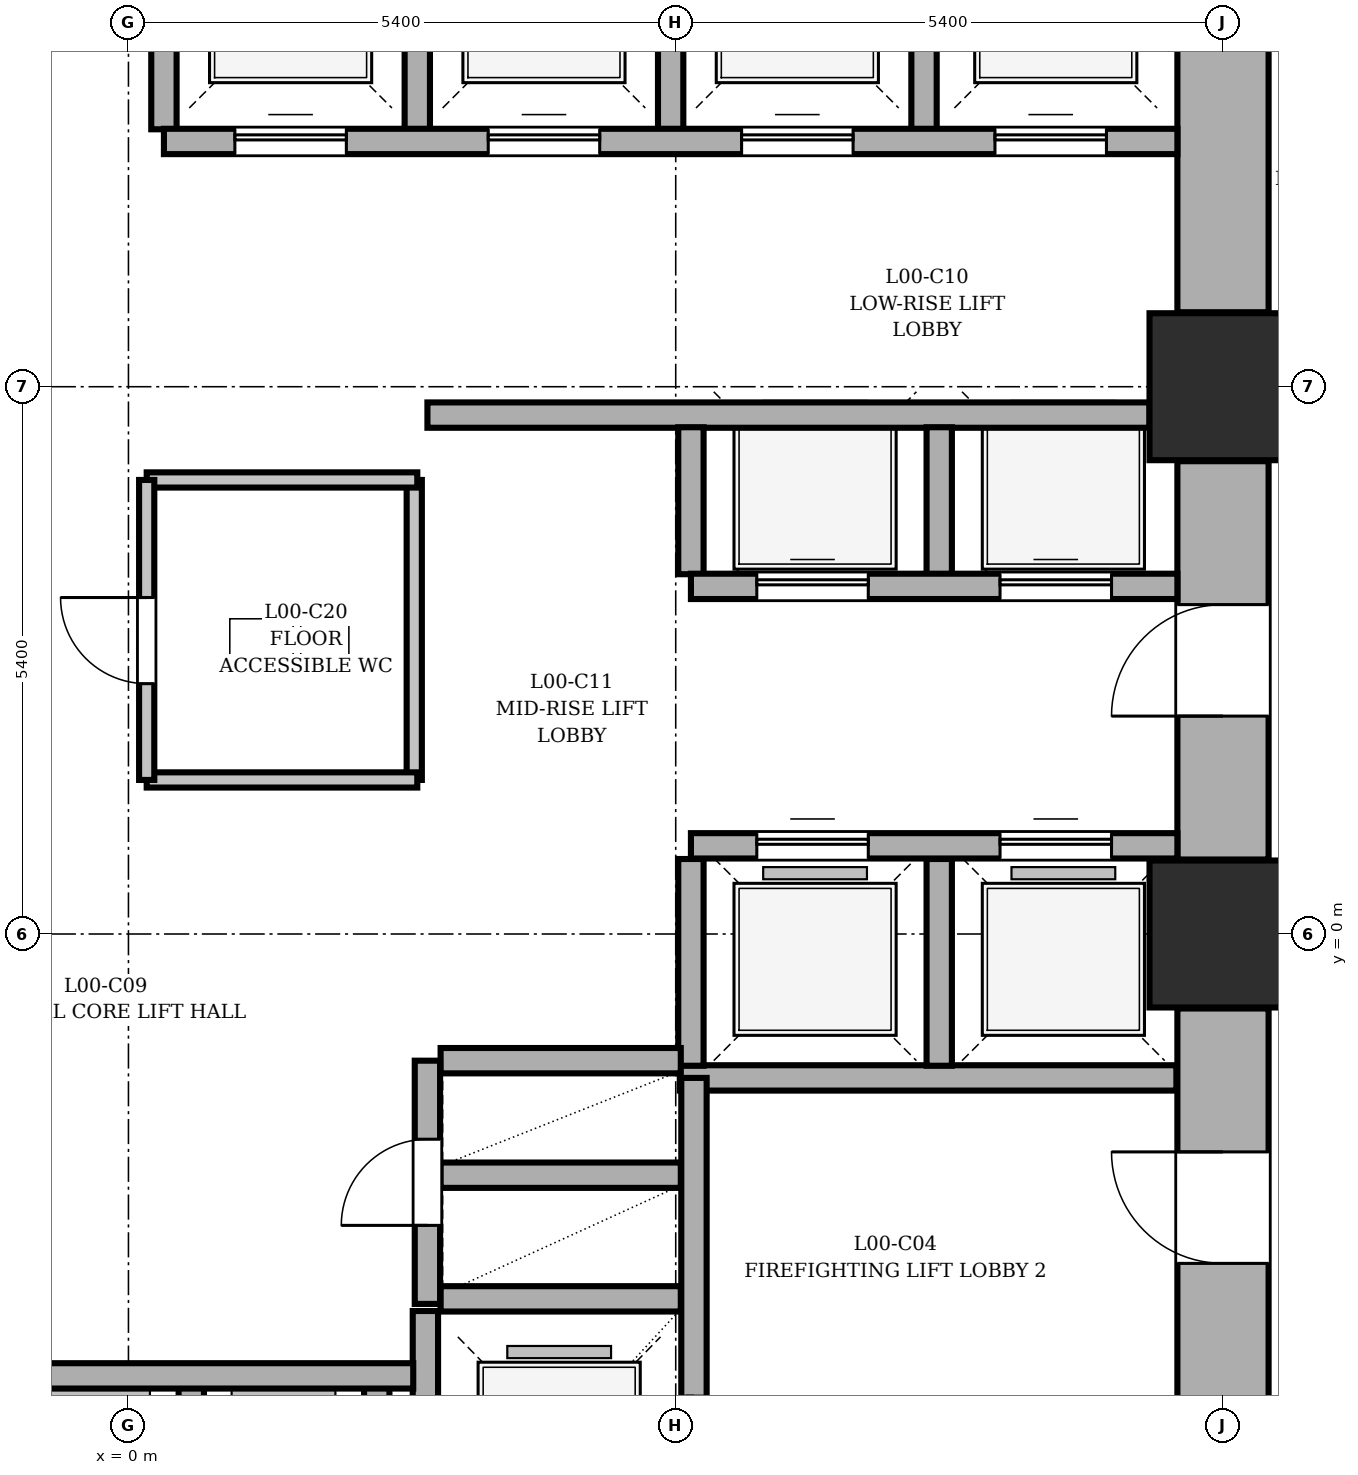
"""IFC4 building model, lengths in metres.
Left out: names, types, materials, properties, quantities, classifications, styles, units other than length and angle.
Written with IfcOpenShell. Run it as: python <this file> out.ifc"""

import sys

from ifc_helpers import new_model, si_unit, direction, frame, frame_2d, origin, origin_2d, place, context, subcontext, project, spatial, rectangle, extrude, element, fill, save


model = new_model("IFC4")
c1 = context("Model", 3, precision=1e-05, world=origin(), true_north=direction((0.0, 1.0)))
c2 = subcontext(c1, "Body", "Model", "MODEL_VIEW")
j1 = project(units=[si_unit("LENGTHUNIT", "METRE"), si_unit("PLANEANGLEUNIT", "RADIAN")], contexts=[c1])
p1 = place(None, origin())
s1 = spatial("IfcSite", under=j1, at=p1, CompositionType="ELEMENT")
p2 = place(p1, origin())
s2 = spatial("IfcBuilding", under=s1, at=p2, CompositionType="ELEMENT")
p3 = place(p2, origin())
s3 = spatial("IfcBuildingStorey", under=s2, at=p3, CompositionType="ELEMENT", Elevation=0.0)
for number, where, z_axis, x_axis in (
    (1, (10.8, 0.0, 0.0), (0.0, 0.0, 1.0), (1.0, 0.0, 0.0)),
    (2, (10.8, 5.4, 0.0), (0.0, 0.0, 1.0), (1.0, 0.0, 0.0)),
):
    element("IfcColumn", number, at=place(p3, frame(where, z_axis=z_axis, x_axis=x_axis)), inside=s3, PredefinedType="COLUMN", context=c2, shape_type="SweptSolid", body=[
        extrude(rectangle(XDim=1.45, YDim=1.45, at=origin_2d()), origin(), (0.0, 0.0, 1.0), 4.5),
    ])
p4 = place(p3, frame((10.8, -4.665, 0.0), z_axis=(0.0, 0.0, 1.0), x_axis=(0.0, 1.0, 0.0)))
e3 = element("IfcWall", 3, at=p4, inside=s3, PredefinedType="SHEAR", context=c2, shape_type="SweptSolid", body=[
    extrude(rectangle(XDim=3.93, YDim=0.9, at=frame_2d((1.965, 0.0))), origin(), (0.0, 0.0, 1.0), 4.5),
])
p5 = place(p4, frame((1.415, 0.0, 0.0)))
e4 = element("IfcOpeningElement", 4, at=p5, cuts=e3, PredefinedType="OPENING", context=c2, shape_type="SweptSolid", body=[
    extrude(rectangle(XDim=1.1, YDim=2.1, at=frame_2d((0.55, 1.05))), frame((0.0, 0.46, 0.0), z_axis=(0.0, -1.0, 0.0), x_axis=(1.0, 0.0, 0.0)), (0.0, 0.0, 1.0), 0.92),
])
p6 = place(p3, frame((10.8, 0.735, 0.0), z_axis=(0.0, 0.0, 1.0), x_axis=(0.0, 1.0, 0.0)))
e5 = element("IfcWall", 5, at=p6, inside=s3, PredefinedType="SHEAR", context=c2, shape_type="SweptSolid", body=[
    extrude(rectangle(XDim=3.93, YDim=0.9, at=frame_2d((1.965, 0.0))), origin(), (0.0, 0.0, 1.0), 4.5),
])
p7 = place(p6, frame((1.415, 0.0, 0.0)))
e6 = element("IfcOpeningElement", 6, at=p7, cuts=e5, PredefinedType="OPENING", context=c2, shape_type="SweptSolid", body=[
    extrude(rectangle(XDim=1.1, YDim=2.1, at=frame_2d((0.55, 1.05))), frame((0.0, 0.46, 0.0), z_axis=(0.0, -1.0, 0.0), x_axis=(1.0, 0.0, 0.0)), (0.0, 0.0, 1.0), 0.92),
])
p8 = place(p3, frame((10.8, 6.135, 0.0), z_axis=(0.0, 0.0, 1.0), x_axis=(0.0, 1.0, 0.0)))
e7 = element("IfcWall", 7, at=p8, inside=s3, PredefinedType="SHEAR", context=c2, shape_type="SweptSolid", body=[
    extrude(rectangle(XDim=3.93, YDim=0.9, at=frame_2d((1.965, 0.0))), origin(), (0.0, 0.0, 1.0), 4.5),
])
p9 = place(p3, frame((2.93, -6.51, 0.0), z_axis=(0.0, 0.0, 1.0), x_axis=(0.0, 1.0, 0.0)))
e8 = element("IfcWall", 8, at=p9, inside=s3, PredefinedType="SHEAR", context=c2, shape_type="SweptSolid", body=[
    extrude(rectangle(XDim=2.79, YDim=0.25, at=frame_2d((1.395, 0.0))), origin(), (0.0, 0.0, 1.0), 4.5),
])
p10 = place(p3, frame((5.44, -1.42, 0.0), z_axis=(0.0, 0.0, 1.0), x_axis=(1.0, 0.0, 0.0)))
e9 = element("IfcWall", 9, at=p10, inside=s3, PredefinedType="SHEAR", context=c2, shape_type="SweptSolid", body=[
    extrude(rectangle(XDim=4.9, YDim=0.25, at=frame_2d((2.45, 0.0))), origin(), (0.0, 0.0, 1.0), 4.5),
])
p11 = place(p3, frame((3.08, -3.6, 0.0), z_axis=(0.0, 0.0, 1.0), x_axis=(1.0, 0.0, 0.0)))
e10 = element("IfcWall", 10, at=p11, inside=s3, PredefinedType="SHEAR", context=c2, shape_type="SweptSolid", body=[
    extrude(rectangle(XDim=2.37, YDim=0.25, at=frame_2d((1.185, 0.0))), origin(), (0.0, 0.0, 1.0), 4.5),
])
p12 = place(p3, frame((5.58, -6.51, 0.0), z_axis=(0.0, 0.0, 1.0), x_axis=(0.0, 1.0, 0.0)))
e11 = element("IfcWall", 11, at=p12, inside=s3, PredefinedType="SHEAR", context=c2, shape_type="SweptSolid", body=[
    extrude(rectangle(XDim=5.09, YDim=0.25, at=frame_2d((2.545, 0.0))), origin(), (0.0, 0.0, 1.0), 4.5),
])
p13 = place(p12, frame((0.85, 0.0, 0.0)))
e12 = element("IfcOpeningElement", 12, at=p13, cuts=e11, PredefinedType="OPENING", context=c2, shape_type="SweptSolid", body=[
    extrude(rectangle(XDim=1.1, YDim=2.1, at=frame_2d((0.55, 1.05))), frame((0.0, 0.135, 0.0), z_axis=(0.0, -1.0, 0.0), x_axis=(1.0, 0.0, 0.0)), (0.0, 0.0, 1.0), 0.27),
])
for number, where, z_axis, x_axis in (
    (13, (0.62, -6.34, 0.0), (0.0, 0.0, 1.0), (0.0, 1.0, 0.0)),
    (14, (2.45, -6.34, 0.0), (0.0, 0.0, 1.0), (0.0, 1.0, 0.0)),
):
    element("IfcWall", number, at=place(p3, frame(where, z_axis=z_axis, x_axis=x_axis)), inside=s3, PredefinedType="SHEAR", context=c2, shape_type="SweptSolid", body=[
        extrude(rectangle(XDim=1.88, YDim=0.25, at=frame_2d((0.94, 0.0))), origin(), (0.0, 0.0, 1.0), 4.5),
    ])
p14 = place(p3, frame((-1.22, -4.36, 0.0), z_axis=(0.0, 0.0, 1.0), x_axis=(1.0, 0.0, 0.0)))
e15 = element("IfcWall", 15, at=p14, inside=s3, PredefinedType="SHEAR", context=c2, shape_type="SweptSolid", body=[
    extrude(rectangle(XDim=4.03, YDim=0.25, at=frame_2d((2.015, 0.0))), origin(), (0.0, 0.0, 1.0), 4.5),
])
p15 = place(p3, frame((2.85, 7.94, 0.0), z_axis=(0.0, 0.0, 1.0), x_axis=(0.0, 1.0, 0.0)))
e16 = element("IfcWall", 16, at=p15, inside=s3, PredefinedType="SHEAR", context=c2, shape_type="SweptSolid", body=[
    extrude(rectangle(XDim=2.41, YDim=0.25, at=frame_2d((1.205, 0.0))), origin(), (0.0, 0.0, 1.0), 4.5),
])
for number, where, z_axis, x_axis in (
    (17, (0.35, 7.94, 0.0), (0.0, 0.0, 1.0), (0.0, 1.0, 0.0)),
    (18, (5.35, 7.94, 0.0), (0.0, 0.0, 1.0), (0.0, 1.0, 0.0)),
):
    element("IfcWall", number, at=place(p3, frame(where, z_axis=z_axis, x_axis=x_axis)), inside=s3, PredefinedType="SHEAR", context=c2, shape_type="SweptSolid", body=[
        extrude(rectangle(XDim=2.135, YDim=0.25, at=frame_2d((1.067, 0.0))), origin(), (0.0, 0.0, 1.0), 4.5),
    ])
p16 = place(p3, frame((7.85, 7.94, 0.0), z_axis=(0.0, 0.0, 1.0), x_axis=(0.0, 1.0, 0.0)))
e19 = element("IfcWall", 19, at=p16, inside=s3, PredefinedType="SHEAR", context=c2, shape_type="SweptSolid", body=[
    extrude(rectangle(XDim=2.41, YDim=0.25, at=frame_2d((1.205, 0.0))), origin(), (0.0, 0.0, 1.0), 4.5),
])
p17 = place(p3, frame((0.35, 7.82, 0.0), z_axis=(0.0, 0.0, 1.0), x_axis=(1.0, 0.0, 0.0)))
e20 = element("IfcWall", 20, at=p17, inside=s3, PredefinedType="SHEAR", context=c2, shape_type="SweptSolid", body=[
    extrude(rectangle(XDim=10.0, YDim=0.25, at=frame_2d((5.0, 0.0))), origin(), (0.0, 0.0, 1.0), 4.5),
])
p18 = place(p17, frame((0.7, 0.0, 0.0)))
e21 = element("IfcOpeningElement", 21, at=p18, cuts=e20, PredefinedType="OPENING", context=c2, shape_type="SweptSolid", body=[
    extrude(rectangle(XDim=1.1, YDim=2.1, at=frame_2d((0.55, 1.05))), frame((0.0, 0.135, 0.0), z_axis=(0.0, -1.0, 0.0), x_axis=(1.0, 0.0, 0.0)), (0.0, 0.0, 1.0), 0.27),
])
p19 = place(p17, frame((3.2, 0.0, 0.0)))
e22 = element("IfcOpeningElement", 22, at=p19, cuts=e20, PredefinedType="OPENING", context=c2, shape_type="SweptSolid", body=[
    extrude(rectangle(XDim=1.1, YDim=2.1, at=frame_2d((0.55, 1.05))), frame((0.0, 0.135, 0.0), z_axis=(0.0, -1.0, 0.0), x_axis=(1.0, 0.0, 0.0)), (0.0, 0.0, 1.0), 0.27),
])
p20 = place(p17, frame((5.7, 0.0, 0.0)))
e23 = element("IfcOpeningElement", 23, at=p20, cuts=e20, PredefinedType="OPENING", context=c2, shape_type="SweptSolid", body=[
    extrude(rectangle(XDim=1.1, YDim=2.1, at=frame_2d((0.55, 1.05))), frame((0.0, 0.135, 0.0), z_axis=(0.0, -1.0, 0.0), x_axis=(1.0, 0.0, 0.0)), (0.0, 0.0, 1.0), 0.27),
])
p21 = place(p17, frame((8.2, 0.0, 0.0)))
e24 = element("IfcOpeningElement", 24, at=p21, cuts=e20, PredefinedType="OPENING", context=c2, shape_type="SweptSolid", body=[
    extrude(rectangle(XDim=1.1, YDim=2.1, at=frame_2d((0.55, 1.05))), frame((0.0, 0.135, 0.0), z_axis=(0.0, -1.0, 0.0), x_axis=(1.0, 0.0, 0.0)), (0.0, 0.0, 1.0), 0.27),
])
p22 = place(p3, frame((2.95, 5.12, 0.0), z_axis=(0.0, 0.0, 1.0), x_axis=(1.0, 0.0, 0.0)))
e25 = element("IfcWall", 25, at=p22, inside=s3, PredefinedType="SHEAR", context=c2, shape_type="SweptSolid", body=[
    extrude(rectangle(XDim=7.125, YDim=0.25, at=frame_2d((3.562, 0.0))), origin(), (0.0, 0.0, 1.0), 4.5),
])
for number, where, z_axis, x_axis in (
    (26, (5.55, 3.55, 0.0), (0.0, 0.0, 1.0), (0.0, 1.0, 0.0)),
    (27, (8.0, 3.55, 0.0), (0.0, 0.0, 1.0), (0.0, 1.0, 0.0)),
):
    element("IfcWall", number, at=place(p3, frame(where, z_axis=z_axis, x_axis=x_axis)), inside=s3, PredefinedType="SHEAR", context=c2, shape_type="SweptSolid", body=[
        extrude(rectangle(XDim=1.45, YDim=0.25, at=frame_2d((0.725, 0.0))), origin(), (0.0, 0.0, 1.0), 4.5),
    ])
for number, where, z_axis, x_axis in (
    (28, (5.55, -1.3, 0.0), (0.0, 0.0, 1.0), (0.0, 1.0, 0.0)),
    (29, (8.0, -1.3, 0.0), (0.0, 0.0, 1.0), (0.0, 1.0, 0.0)),
):
    element("IfcWall", number, at=place(p3, frame(where, z_axis=z_axis, x_axis=x_axis)), inside=s3, PredefinedType="SHEAR", context=c2, shape_type="SweptSolid", body=[
        extrude(rectangle(XDim=2.04, YDim=0.25, at=frame_2d((1.02, 0.0))), origin(), (0.0, 0.0, 1.0), 4.5),
    ])
p23 = place(p3, frame((5.55, 3.43, 0.0), z_axis=(0.0, 0.0, 1.0), x_axis=(1.0, 0.0, 0.0)))
e30 = element("IfcWall", 30, at=p23, inside=s3, PredefinedType="SHEAR", context=c2, shape_type="SweptSolid", body=[
    extrude(rectangle(XDim=4.8, YDim=0.25, at=frame_2d((2.4, 0.0))), origin(), (0.0, 0.0, 1.0), 4.5),
])
p24 = place(p23, frame((0.65, 0.0, 0.0)))
e31 = element("IfcOpeningElement", 31, at=p24, cuts=e30, PredefinedType="OPENING", context=c2, shape_type="SweptSolid", body=[
    extrude(rectangle(XDim=1.1, YDim=2.1, at=frame_2d((0.55, 1.05))), frame((0.0, 0.135, 0.0), z_axis=(0.0, -1.0, 0.0), x_axis=(1.0, 0.0, 0.0)), (0.0, 0.0, 1.0), 0.27),
])
p25 = place(p23, frame((3.05, 0.0, 0.0)))
e32 = element("IfcOpeningElement", 32, at=p25, cuts=e30, PredefinedType="OPENING", context=c2, shape_type="SweptSolid", body=[
    extrude(rectangle(XDim=1.1, YDim=2.1, at=frame_2d((0.55, 1.05))), frame((0.0, 0.135, 0.0), z_axis=(0.0, -1.0, 0.0), x_axis=(1.0, 0.0, 0.0)), (0.0, 0.0, 1.0), 0.27),
])
p26 = place(p3, frame((5.55, 0.87, 0.0), z_axis=(0.0, 0.0, 1.0), x_axis=(1.0, 0.0, 0.0)))
e33 = element("IfcWall", 33, at=p26, inside=s3, PredefinedType="SHEAR", context=c2, shape_type="SweptSolid", body=[
    extrude(rectangle(XDim=4.8, YDim=0.25, at=frame_2d((2.4, 0.0))), origin(), (0.0, 0.0, 1.0), 4.5),
])
p27 = place(p26, frame((0.65, 0.0, 0.0)))
e34 = element("IfcOpeningElement", 34, at=p27, cuts=e33, PredefinedType="OPENING", context=c2, shape_type="SweptSolid", body=[
    extrude(rectangle(XDim=1.1, YDim=2.1, at=frame_2d((0.55, 1.05))), frame((0.0, 0.135, 0.0), z_axis=(0.0, -1.0, 0.0), x_axis=(1.0, 0.0, 0.0)), (0.0, 0.0, 1.0), 0.27),
])
p28 = place(p26, frame((3.05, 0.0, 0.0)))
e35 = element("IfcOpeningElement", 35, at=p28, cuts=e33, PredefinedType="OPENING", context=c2, shape_type="SweptSolid", body=[
    extrude(rectangle(XDim=1.1, YDim=2.1, at=frame_2d((0.55, 1.05))), frame((0.0, 0.135, 0.0), z_axis=(0.0, -1.0, 0.0), x_axis=(1.0, 0.0, 0.0)), (0.0, 0.0, 1.0), 0.27),
])
for number, where, z_axis, x_axis in (
    (36, (3.08, -2.38, 0.0), (0.0, 0.0, 1.0), (1.0, 0.0, 0.0)),
    (37, (3.08, -1.25, 0.0), (0.0, 0.0, 1.0), (1.0, 0.0, 0.0)),
):
    element("IfcWall", number, at=place(p3, frame(where, z_axis=z_axis, x_axis=x_axis)), inside=s3, PredefinedType="SHEAR", context=c2, shape_type="SweptSolid", body=[
        extrude(rectangle(XDim=2.37, YDim=0.25, at=frame_2d((1.185, 0.0))), origin(), (0.0, 0.0, 1.0), 4.5),
    ])
p29 = place(p3, frame((2.95, -3.65, 0.0), z_axis=(0.0, 0.0, 1.0), x_axis=(0.0, 1.0, 0.0)))
e38 = element("IfcWall", 38, at=p29, inside=s3, PredefinedType="SHEAR", context=c2, shape_type="SweptSolid", body=[
    extrude(rectangle(XDim=2.4, YDim=0.25, at=frame_2d((1.2, 0.0))), origin(), (0.0, 0.0, 1.0), 4.5),
])
p30 = place(p29, frame((0.775, 0.0, 0.0)))
e39 = element("IfcOpeningElement", 39, at=p30, cuts=e38, PredefinedType="OPENING", context=c2, shape_type="SweptSolid", body=[
    extrude(rectangle(XDim=0.85, YDim=2.1, at=frame_2d((0.425, 1.05))), frame((0.0, 0.135, 0.0), z_axis=(0.0, -1.0, 0.0), x_axis=(1.0, 0.0, 0.0)), (0.0, 0.0, 1.0), 0.27),
])
p31 = place(p3, frame((2.82, 1.52, 0.0), z_axis=(0.0, 0.0, 1.0), x_axis=(0.0, 1.0, 0.0)))
e40 = element("IfcWall", 40, at=p31, inside=s3, PredefinedType="PARTITIONING", context=c2, shape_type="SweptSolid", body=[
    extrude(rectangle(XDim=2.96, YDim=0.15, at=frame_2d((1.48, 0.0))), origin(), (0.0, 0.0, 1.0), 4.2),
])
for number, where, z_axis, x_axis in (
    (41, (0.18, 4.48, 0.0), (0.0, 0.0, 1.0), (1.0, 0.0, 0.0)),
    (42, (0.18, 1.52, 0.0), (0.0, 0.0, 1.0), (1.0, 0.0, 0.0)),
):
    element("IfcWall", number, at=place(p3, frame(where, z_axis=z_axis, x_axis=x_axis)), inside=s3, PredefinedType="PARTITIONING", context=c2, shape_type="SweptSolid", body=[
        extrude(rectangle(XDim=2.67, YDim=0.15, at=frame_2d((1.335, 0.0))), origin(), (0.0, 0.0, 1.0), 4.2),
    ])
p32 = place(p3, frame((0.18, 1.52, 0.0), z_axis=(0.0, 0.0, 1.0), x_axis=(0.0, 1.0, 0.0)))
e43 = element("IfcWall", 43, at=p32, inside=s3, PredefinedType="PARTITIONING", context=c2, shape_type="SweptSolid", body=[
    extrude(rectangle(XDim=2.96, YDim=0.15, at=frame_2d((1.48, 0.0))), origin(), (0.0, 0.0, 1.0), 4.2),
])
p33 = place(p32, frame((0.95, 0.0, 0.0)))
e44 = element("IfcOpeningElement", 44, at=p33, cuts=e43, PredefinedType="OPENING", context=c2, shape_type="SweptSolid", body=[
    extrude(rectangle(XDim=0.85, YDim=2.1, at=frame_2d((0.425, 1.05))), frame((0.0, 0.085, 0.0), z_axis=(0.0, -1.0, 0.0), x_axis=(1.0, 0.0, 0.0)), (0.0, 0.0, 1.0), 0.17),
])
p34 = place(p3, frame((10.85, 0.0, 0.0), z_axis=(0.0, 0.0, 1.0), x_axis=(1.0, 0.0, 0.0)))
e45 = element("IfcWall", 45, at=p34, inside=s3, PredefinedType="PARTITIONING", context=c2, shape_type="SweptSolid", body=[
    extrude(rectangle(XDim=10.71, YDim=0.2, at=frame_2d((5.355, 0.0))), origin(), (0.0, 0.0, 1.0), 2.205),
])
p35 = place(p34, frame((2.25, 0.0, 0.0)))
e46 = element("IfcOpeningElement", 46, at=p35, cuts=e45, PredefinedType="OPENING", context=c2, shape_type="SweptSolid", body=[
    extrude(rectangle(XDim=1.1, YDim=2.1, at=frame_2d((0.55, 1.05))), frame((0.0, 0.11, 0.0), z_axis=(0.0, -1.0, 0.0), x_axis=(1.0, 0.0, 0.0)), (0.0, 0.0, 1.0), 0.22),
])
p36 = place(p33, origin())
e47 = element("IfcDoor", 47, at=p36, inside=s3, OperationType="SINGLE_SWING_RIGHT", PredefinedType="DOOR", context=c2, shape_type="SweptSolid", body=[
    extrude(rectangle(XDim=0.85, YDim=2.1, at=frame_2d((0.425, 1.05))), frame((0.0, 0.025, 0.0), z_axis=(0.0, -1.0, 0.0), x_axis=(1.0, 0.0, 0.0)), (0.0, 0.0, 1.0), 0.05),
])
fill(e44, e47)
p37 = place(p30, origin())
e48 = element("IfcDoor", 48, at=p37, inside=s3, OperationType="SINGLE_SWING_LEFT", PredefinedType="DOOR", context=c2, shape_type="SweptSolid", body=[
    extrude(rectangle(XDim=0.85, YDim=2.1, at=frame_2d((0.425, 1.05))), frame((0.0, 0.025, 0.0), z_axis=(0.0, -1.0, 0.0), x_axis=(1.0, 0.0, 0.0)), (0.0, 0.0, 1.0), 0.05),
])
fill(e39, e48)
p38 = place(p5, origin())
e49 = element("IfcDoor", 49, at=p38, inside=s3, OperationType="SINGLE_SWING_RIGHT", PredefinedType="DOOR", context=c2, shape_type="SweptSolid", body=[
    extrude(rectangle(XDim=1.1, YDim=2.1, at=frame_2d((0.55, 1.05))), frame((0.0, 0.025, 0.0), z_axis=(0.0, -1.0, 0.0), x_axis=(1.0, 0.0, 0.0)), (0.0, 0.0, 1.0), 0.05),
])
fill(e4, e49)
p39 = place(p18, origin())
e50 = element("IfcDoor", 50, at=p39, inside=s3, OperationType="SLIDING_TO_LEFT", PredefinedType="DOOR", context=c2, shape_type="SweptSolid", body=[
    extrude(rectangle(XDim=1.1, YDim=2.1, at=frame_2d((0.55, 1.05))), frame((0.0, 0.025, 0.0), z_axis=(0.0, -1.0, 0.0), x_axis=(1.0, 0.0, 0.0)), (0.0, 0.0, 1.0), 0.05),
])
fill(e21, e50)
p40 = place(p19, origin())
e51 = element("IfcDoor", 51, at=p40, inside=s3, OperationType="SLIDING_TO_LEFT", PredefinedType="DOOR", context=c2, shape_type="SweptSolid", body=[
    extrude(rectangle(XDim=1.1, YDim=2.1, at=frame_2d((0.55, 1.05))), frame((0.0, 0.025, 0.0), z_axis=(0.0, -1.0, 0.0), x_axis=(1.0, 0.0, 0.0)), (0.0, 0.0, 1.0), 0.05),
])
fill(e22, e51)
p41 = place(p20, origin())
e52 = element("IfcDoor", 52, at=p41, inside=s3, OperationType="SLIDING_TO_LEFT", PredefinedType="DOOR", context=c2, shape_type="SweptSolid", body=[
    extrude(rectangle(XDim=1.1, YDim=2.1, at=frame_2d((0.55, 1.05))), frame((0.0, 0.025, 0.0), z_axis=(0.0, -1.0, 0.0), x_axis=(1.0, 0.0, 0.0)), (0.0, 0.0, 1.0), 0.05),
])
fill(e23, e52)
p42 = place(p21, origin())
e53 = element("IfcDoor", 53, at=p42, inside=s3, OperationType="SLIDING_TO_LEFT", PredefinedType="DOOR", context=c2, shape_type="SweptSolid", body=[
    extrude(rectangle(XDim=1.1, YDim=2.1, at=frame_2d((0.55, 1.05))), frame((0.0, 0.025, 0.0), z_axis=(0.0, -1.0, 0.0), x_axis=(1.0, 0.0, 0.0)), (0.0, 0.0, 1.0), 0.05),
])
fill(e24, e53)
p43 = place(p24, origin())
e54 = element("IfcDoor", 54, at=p43, inside=s3, OperationType="SLIDING_TO_RIGHT", PredefinedType="DOOR", context=c2, shape_type="SweptSolid", body=[
    extrude(rectangle(XDim=1.1, YDim=2.1, at=frame_2d((0.55, 1.05))), frame((0.0, 0.025, 0.0), z_axis=(0.0, -1.0, 0.0), x_axis=(1.0, 0.0, 0.0)), (0.0, 0.0, 1.0), 0.05),
])
fill(e31, e54)
p44 = place(p25, origin())
e55 = element("IfcDoor", 55, at=p44, inside=s3, OperationType="SLIDING_TO_RIGHT", PredefinedType="DOOR", context=c2, shape_type="SweptSolid", body=[
    extrude(rectangle(XDim=1.1, YDim=2.1, at=frame_2d((0.55, 1.05))), frame((0.0, 0.025, 0.0), z_axis=(0.0, -1.0, 0.0), x_axis=(1.0, 0.0, 0.0)), (0.0, 0.0, 1.0), 0.05),
])
fill(e32, e55)
p45 = place(p27, origin())
e56 = element("IfcDoor", 56, at=p45, inside=s3, OperationType="SLIDING_TO_RIGHT", PredefinedType="DOOR", context=c2, shape_type="SweptSolid", body=[
    extrude(rectangle(XDim=1.1, YDim=2.1, at=frame_2d((0.55, 1.05))), frame((0.0, 0.025, 0.0), z_axis=(0.0, -1.0, 0.0), x_axis=(1.0, 0.0, 0.0)), (0.0, 0.0, 1.0), 0.05),
])
fill(e34, e56)
p46 = place(p28, origin())
e57 = element("IfcDoor", 57, at=p46, inside=s3, OperationType="SLIDING_TO_RIGHT", PredefinedType="DOOR", context=c2, shape_type="SweptSolid", body=[
    extrude(rectangle(XDim=1.1, YDim=2.1, at=frame_2d((0.55, 1.05))), frame((0.0, 0.025, 0.0), z_axis=(0.0, -1.0, 0.0), x_axis=(1.0, 0.0, 0.0)), (0.0, 0.0, 1.0), 0.05),
])
fill(e35, e57)
p47 = place(p7, origin())
e58 = element("IfcDoor", 58, at=p47, inside=s3, OperationType="SINGLE_SWING_LEFT", PredefinedType="DOOR", context=c2, shape_type="SweptSolid", body=[
    extrude(rectangle(XDim=1.1, YDim=2.1, at=frame_2d((0.55, 1.05))), frame((0.0, 0.025, 0.0), z_axis=(0.0, -1.0, 0.0), x_axis=(1.0, 0.0, 0.0)), (0.0, 0.0, 1.0), 0.05),
])
fill(e6, e58)
save(model, sys.argv[1])
